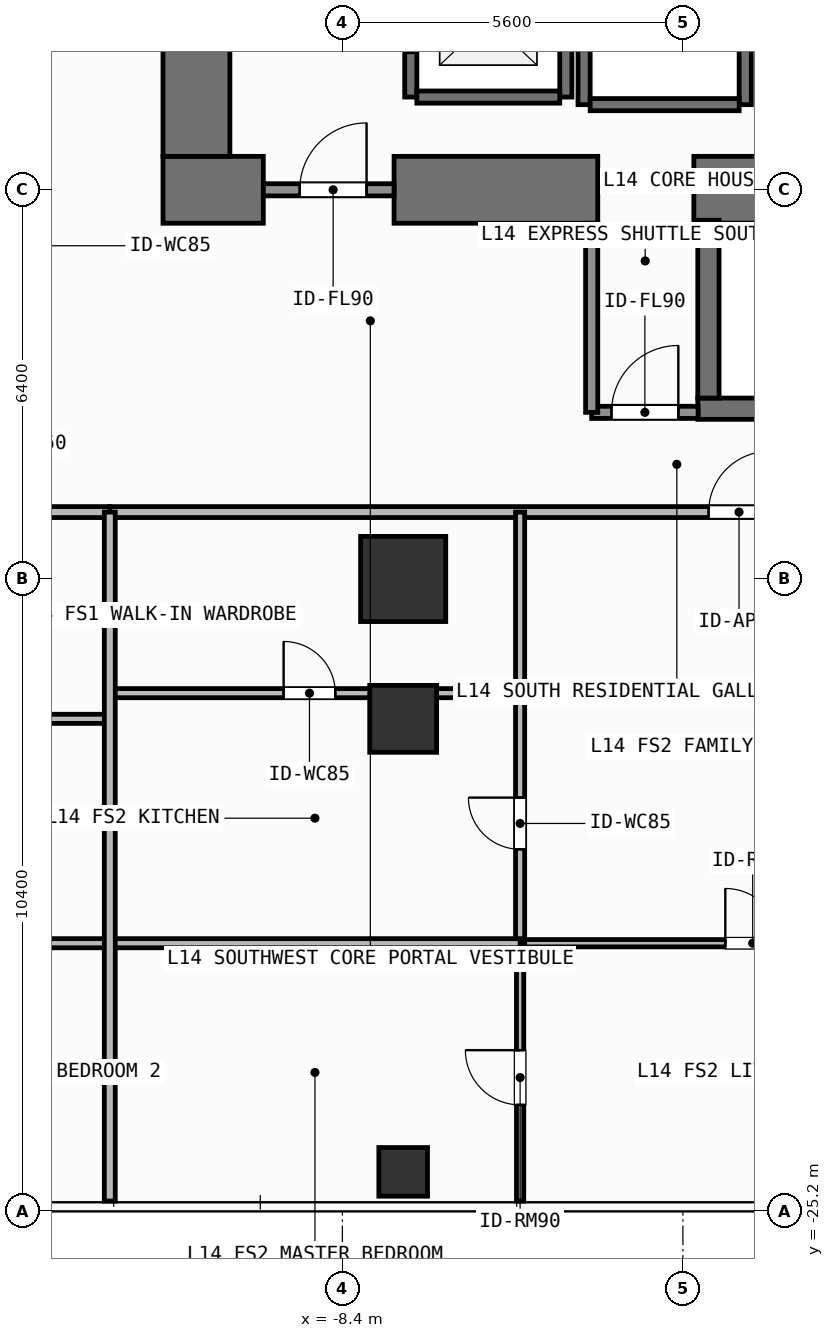
"""IFC4 building model, lengths in metres.
Left out: names, types, materials, properties, quantities, classifications, styles, units other than length and angle.
Written with IfcOpenShell. Run it as: python <this file> out.ifc"""

import sys

from ifc_helpers import new_model, si_unit, direction, frame, frame_2d, origin, origin_2d, place, context, subcontext, project, spatial, rectangle, hollow_rectangle, extrude, element, fill, save


model = new_model("IFC4")
c1 = context("Model", 3, precision=1e-05, world=origin(), true_north=direction((0.0, 1.0)))
c2 = subcontext(c1, "Body", "Model", "MODEL_VIEW")
j1 = project(units=[si_unit("LENGTHUNIT", "METRE"), si_unit("PLANEANGLEUNIT", "RADIAN")], contexts=[c1])
p1 = place(None, origin())
s1 = spatial("IfcSite", under=j1, at=p1, CompositionType="ELEMENT")
p2 = place(p1, origin())
s2 = spatial("IfcBuilding", under=s1, at=p2, CompositionType="ELEMENT")
p3 = place(p2, frame((0.0, 0.0, 54.0)))
s3 = spatial("IfcBuildingStorey", under=s2, at=p3, CompositionType="ELEMENT", Elevation=54.0)
p4 = place(p3, frame((-11.35, -8.4, 0.0), z_axis=(0.0, 0.0, 1.0), x_axis=(1.0, 0.0, 0.0)))
e1 = element("IfcWall", 1, at=p4, inside=s3, PredefinedType="SHEAR", context=c2, shape_type="SweptSolid", body=[
    extrude(rectangle(XDim=1.65, YDim=1.1, at=frame_2d((0.825, 0.0))), origin(), (0.0, 0.0, 1.0), 3.9),
])
p5 = place(p3, frame((-7.55, -8.4, 0.0), z_axis=(0.0, 0.0, 1.0), x_axis=(1.0, 0.0, 0.0)))
e2 = element("IfcWall", 2, at=p5, inside=s3, PredefinedType="SHEAR", context=c2, shape_type="SweptSolid", body=[
    extrude(rectangle(XDim=3.35, YDim=1.1, at=frame_2d((1.675, 0.0))), origin(), (0.0, 0.0, 1.0), 3.9),
])
p6 = place(p3, frame((-2.62, -8.4, 0.0), z_axis=(0.0, 0.0, 1.0), x_axis=(1.0, 0.0, 0.0)))
e3 = element("IfcWall", 3, at=p6, inside=s3, PredefinedType="SHEAR", context=c2, shape_type="SweptSolid", body=[
    extrude(rectangle(XDim=7.27, YDim=1.1, at=frame_2d((3.635, 0.0))), origin(), (0.0, 0.0, 1.0), 3.9),
])
p7 = place(p3, frame((-10.8, -7.85, 0.0), z_axis=(0.0, 0.0, 1.0), x_axis=(0.0, 1.0, 0.0)))
e4 = element("IfcWall", 4, at=p7, inside=s3, PredefinedType="SHEAR", context=c2, shape_type="SweptSolid", body=[
    extrude(rectangle(XDim=15.7, YDim=1.1, at=frame_2d((7.85, 0.0))), origin(), (0.0, 0.0, 1.0), 3.9),
])
p8 = place(p3, frame((-2.555, -12.0, 0.0), z_axis=(0.0, 0.0, 1.0), x_axis=(1.0, 0.0, 0.0)))
e5 = element("IfcWall", 5, at=p8, inside=s3, PredefinedType="SHEAR", context=c2, shape_type="SweptSolid", body=[
    extrude(rectangle(XDim=7.31, YDim=0.35, at=frame_2d((3.655, 0.0))), origin(), (0.0, 0.0, 1.0), 3.9),
])
p9 = place(p3, frame((-2.2, -8.988, 0.0), z_axis=(0.0, 0.0, 1.0), x_axis=(1.0, 0.0, 0.0)))
e6 = element("IfcWall", 6, at=p9, inside=s3, PredefinedType="SHEAR", context=c2, shape_type="SweptSolid", body=[
    extrude(rectangle(XDim=6.6, YDim=0.075, at=frame_2d((3.3, 0.0))), origin(), (0.0, 0.0, 1.0), 3.9),
])
p10 = place(p3, frame((-2.38, -11.825, 0.0), z_axis=(0.0, 0.0, 1.0), x_axis=(0.0, 1.0, 0.0)))
e7 = element("IfcWall", 7, at=p10, inside=s3, PredefinedType="SHEAR", context=c2, shape_type="SweptSolid", body=[
    extrude(rectangle(XDim=2.925, YDim=0.35, at=frame_2d((1.462, 0.0))), origin(), (0.0, 0.0, 1.0), 3.9),
])
p11 = place(p3, frame((-7.4, -14.8, 0.0), z_axis=(0.0, 0.0, 1.0), x_axis=(1.0, 0.0, 0.0)))
e8 = element("IfcColumn", 8, at=p11, inside=s3, PredefinedType="COLUMN", context=c2, shape_type="SweptSolid", body=[
    extrude(rectangle(XDim=1.4, YDim=1.4, at=origin_2d()), origin(), (0.0, 0.0, 1.0), 3.9),
])
p12 = place(p3, frame((-7.4, -17.1, 0.0), z_axis=(0.0, 0.0, 1.0), x_axis=(1.0, 0.0, 0.0)))
e9 = element("IfcColumn", 9, at=p12, inside=s3, PredefinedType="COLUMN", context=c2, shape_type="SweptSolid", body=[
    extrude(rectangle(XDim=1.1, YDim=1.1, at=origin_2d()), origin(), (0.0, 0.0, 1.0), 3.9),
])
p13 = place(p3, frame((-7.4, -24.55, 0.0), z_axis=(0.0, 0.0, 1.0), x_axis=(1.0, 0.0, 0.0)))
e10 = element("IfcColumn", 10, at=p13, inside=s3, PredefinedType="COLUMN", context=c2, shape_type="SweptSolid", body=[
    extrude(hollow_rectangle(XDim=0.8, YDim=0.8, WallThickness=0.036, at=origin_2d()), origin(), (0.0, 0.0, 1.0), 3.9),
])
p14 = place(p3, frame((-7.275, -6.875, 0.0), z_axis=(0.0, 0.0, 1.0), x_axis=(0.0, 1.0, 0.0)))
e11 = element("IfcWall", 11, at=p14, inside=s3, PredefinedType="SHEAR", context=c2, shape_type="SweptSolid", body=[
    extrude(rectangle(XDim=2.55, YDim=0.2, at=frame_2d((1.275, 0.0))), origin(), (0.0, 0.0, 1.0), 3.68),
])
p15 = place(p14, frame((0.725, 0.0, 0.0)))
e12 = element("IfcOpeningElement", 12, at=p15, cuts=e11, PredefinedType="OPENING", context=c2, shape_type="SweptSolid", body=[
    extrude(rectangle(XDim=1.1, YDim=2.2, at=frame_2d((0.55, 1.1))), frame((0.0, 0.11, 0.0), z_axis=(0.0, -1.0, 0.0), x_axis=(1.0, 0.0, 0.0)), (0.0, 0.0, 1.0), 0.22),
])
p16 = place(p3, frame((-4.725, -6.875, 0.0), z_axis=(0.0, 0.0, 1.0), x_axis=(0.0, 1.0, 0.0)))
e13 = element("IfcWall", 13, at=p16, inside=s3, PredefinedType="SHEAR", context=c2, shape_type="SweptSolid", body=[
    extrude(rectangle(XDim=2.55, YDim=0.2, at=frame_2d((1.275, 0.0))), origin(), (0.0, 0.0, 1.0), 3.68),
])
p17 = place(p3, frame((-7.175, -6.875, 0.0), z_axis=(0.0, 0.0, 1.0), x_axis=(1.0, 0.0, 0.0)))
e14 = element("IfcWall", 14, at=p17, inside=s3, PredefinedType="SHEAR", context=c2, shape_type="SweptSolid", body=[
    extrude(rectangle(XDim=2.35, YDim=0.2, at=frame_2d((1.175, 0.0))), origin(), (0.0, 0.0, 1.0), 3.68),
])
for number, where, z_axis, x_axis in (
    (15, (-4.425, -7.0, 0.0), (0.0, 0.0, 1.0), (0.0, 1.0, 0.0)),
    (16, (-1.775, -7.0, 0.0), (0.0, 0.0, 1.0), (0.0, 1.0, 0.0)),
):
    element("IfcWall", number, at=place(p3, frame(where, z_axis=z_axis, x_axis=x_axis)), inside=s3, PredefinedType="SHEAR", context=c2, shape_type="SweptSolid", body=[
        extrude(rectangle(XDim=2.8, YDim=0.2, at=frame_2d((1.4, 0.0))), origin(), (0.0, 0.0, 1.0), 3.68),
    ])
p18 = place(p3, frame((-4.325, -7.0, 0.0), z_axis=(0.0, 0.0, 1.0), x_axis=(1.0, 0.0, 0.0)))
e17 = element("IfcWall", 17, at=p18, inside=s3, PredefinedType="SHEAR", context=c2, shape_type="SweptSolid", body=[
    extrude(rectangle(XDim=2.45, YDim=0.2, at=frame_2d((1.225, 0.0))), origin(), (0.0, 0.0, 1.0), 3.68),
])
p19 = place(p3, frame((-9.7, -8.4, 0.0), z_axis=(0.0, 0.0, 1.0), x_axis=(1.0, 0.0, 0.0)))
e18 = element("IfcWall", 18, at=p19, inside=s3, PredefinedType="SOLIDWALL", context=c2, shape_type="SweptSolid", body=[
    extrude(rectangle(XDim=2.15, YDim=0.2, at=frame_2d((1.075, 0.0))), origin(), (0.0, 0.0, 1.0), 2.72),
])
p20 = place(p19, frame((0.598, 0.0, 0.0)))
e19 = element("IfcOpeningElement", 19, at=p20, cuts=e18, PredefinedType="OPENING", context=c2, shape_type="SweptSolid", body=[
    extrude(rectangle(XDim=1.1, YDim=2.15, at=frame_2d((0.55, 1.075))), frame((0.0, 0.11, 0.0), z_axis=(0.0, -1.0, 0.0), x_axis=(1.0, 0.0, 0.0)), (0.0, 0.0, 1.0), 0.22),
])
p21 = place(p3, frame((-4.3, -12.06, 0.0), z_axis=(0.0, 0.0, 1.0), x_axis=(1.0, 0.0, 0.0)))
e20 = element("IfcWall", 20, at=p21, inside=s3, PredefinedType="SOLIDWALL", context=c2, shape_type="SweptSolid", body=[
    extrude(rectangle(XDim=1.75, YDim=0.2, at=frame_2d((0.875, 0.0))), origin(), (0.0, 0.0, 1.0), 3.68),
])
p22 = place(p21, frame((0.325, 0.0, 0.0)))
e21 = element("IfcOpeningElement", 21, at=p22, cuts=e20, PredefinedType="OPENING", context=c2, shape_type="SweptSolid", body=[
    extrude(rectangle(XDim=1.1, YDim=2.15, at=frame_2d((0.55, 1.075))), frame((0.0, 0.11, 0.0), z_axis=(0.0, -1.0, 0.0), x_axis=(1.0, 0.0, 0.0)), (0.0, 0.0, 1.0), 0.22),
])
p23 = place(p3, frame((-24.42, -13.7, 0.0), z_axis=(0.0, 0.0, 1.0), x_axis=(1.0, 0.0, 0.0)))
e22 = element("IfcWall", 22, at=p23, inside=s3, PredefinedType="PARTITIONING", context=c2, shape_type="SweptSolid", body=[
    extrude(rectangle(XDim=12.195, YDim=0.18, at=frame_2d((6.097, 0.0))), origin(), (0.0, 0.0, 1.0), 3.68),
])
p24 = place(p23, frame((6.221, 0.0, 0.0)))
e23 = element("IfcOpeningElement", 23, at=p24, cuts=e22, PredefinedType="OPENING", context=c2, shape_type="SweptSolid", body=[
    extrude(rectangle(XDim=1.0, YDim=2.2, at=frame_2d((0.5, 1.1))), frame((0.0, 0.1, 0.0), z_axis=(0.0, -1.0, 0.0), x_axis=(1.0, 0.0, 0.0)), (0.0, 0.0, 1.0), 0.2),
])
p25 = place(p3, frame((-12.225, -13.7, 0.0), z_axis=(0.0, 0.0, 1.0), x_axis=(1.0, 0.0, 0.0)))
e24 = element("IfcWall", 24, at=p25, inside=s3, PredefinedType="PARTITIONING", context=c2, shape_type="SweptSolid", body=[
    extrude(rectangle(XDim=17.467, YDim=0.18, at=frame_2d((8.733, 0.0))), origin(), (0.0, 0.0, 1.0), 3.68),
])
p26 = place(p25, frame((9.848, 0.0, 0.0)))
e25 = element("IfcOpeningElement", 25, at=p26, cuts=e24, PredefinedType="OPENING", context=c2, shape_type="SweptSolid", body=[
    extrude(rectangle(XDim=1.0, YDim=2.2, at=frame_2d((0.5, 1.1))), frame((0.0, 0.1, 0.0), z_axis=(0.0, -1.0, 0.0), x_axis=(1.0, 0.0, 0.0)), (0.0, 0.0, 1.0), 0.2),
])
p27 = place(p3, frame((-5.477, -20.79, 0.0), z_axis=(0.0, 0.0, 1.0), x_axis=(1.0, 0.0, 0.0)))
e26 = element("IfcWall", 26, at=p27, inside=s3, PredefinedType="PARTITIONING", context=c2, shape_type="SweptSolid", body=[
    extrude(rectangle(XDim=7.471, YDim=0.12, at=frame_2d((3.735, 0.0))), origin(), (0.0, 0.0, 1.0), 3.68),
])
p28 = place(p27, frame((3.375, 0.0, 0.0)))
e27 = element("IfcOpeningElement", 27, at=p28, cuts=e26, PredefinedType="OPENING", context=c2, shape_type="SweptSolid", body=[
    extrude(rectangle(XDim=0.9, YDim=2.1, at=frame_2d((0.45, 1.05))), frame((0.0, 0.07, 0.0), z_axis=(0.0, -1.0, 0.0), x_axis=(1.0, 0.0, 0.0)), (0.0, 0.0, 1.0), 0.14),
])
p29 = place(p3, frame((-5.477, -20.79, 0.0), z_axis=(0.0, 0.0, 1.0), x_axis=(0.0, 1.0, 0.0)))
e28 = element("IfcWall", 28, at=p29, inside=s3, PredefinedType="PARTITIONING", context=c2, shape_type="SweptSolid", body=[
    extrude(rectangle(XDim=4.112, YDim=0.15, at=frame_2d((2.056, 0.0))), origin(), (0.0, 0.0, 1.0), 3.68),
])
p30 = place(p29, frame((1.544, 0.0, 0.0)))
e29 = element("IfcOpeningElement", 29, at=p30, cuts=e28, PredefinedType="OPENING", context=c2, shape_type="SweptSolid", body=[
    extrude(rectangle(XDim=0.85, YDim=2.1, at=frame_2d((0.425, 1.05))), frame((0.0, 0.085, 0.0), z_axis=(0.0, -1.0, 0.0), x_axis=(1.0, 0.0, 0.0)), (0.0, 0.0, 1.0), 0.17),
])
p31 = place(p3, frame((-5.477, -16.678, 0.0), z_axis=(0.0, 0.0, 1.0), x_axis=(0.0, 1.0, 0.0)))
e30 = element("IfcWall", 30, at=p31, inside=s3, PredefinedType="PARTITIONING", context=c2, shape_type="SweptSolid", body=[
    extrude(rectangle(XDim=2.978, YDim=0.15, at=frame_2d((1.489, 0.0))), origin(), (0.0, 0.0, 1.0), 3.68),
])
p32 = place(p3, frame((-5.477, -25.03, 0.0), z_axis=(0.0, 0.0, 1.0), x_axis=(0.0, 1.0, 0.0)))
e31 = element("IfcWall", 31, at=p32, inside=s3, PredefinedType="PARTITIONING", context=c2, shape_type="SweptSolid", body=[
    extrude(rectangle(XDim=4.24, YDim=0.12, at=frame_2d((2.12, 0.0))), origin(), (0.0, 0.0, 1.0), 3.68),
])
p33 = place(p32, frame((1.581, 0.0, 0.0)))
e32 = element("IfcOpeningElement", 32, at=p33, cuts=e31, PredefinedType="OPENING", context=c2, shape_type="SweptSolid", body=[
    extrude(rectangle(XDim=0.9, YDim=2.1, at=frame_2d((0.45, 1.05))), frame((0.0, 0.07, 0.0), z_axis=(0.0, -1.0, 0.0), x_axis=(1.0, 0.0, 0.0)), (0.0, 0.0, 1.0), 0.14),
])
p34 = place(p3, frame((-4.3, -12.06, 0.0), z_axis=(0.0, 0.0, 1.0), x_axis=(0.0, 1.0, 0.0)))
e33 = element("IfcWall", 33, at=p34, inside=s3, PredefinedType="SOLIDWALL", context=c2, shape_type="SweptSolid", body=[
    extrude(rectangle(XDim=3.11, YDim=0.2, at=frame_2d((1.555, 0.0))), origin(), (0.0, 0.0, 1.0), 3.68),
])
p35 = place(p3, frame((-16.791, -17.1, 0.0), z_axis=(0.0, 0.0, 1.0), x_axis=(1.0, 0.0, 0.0)))
e34 = element("IfcWall", 34, at=p35, inside=s3, PredefinedType="PARTITIONING", context=c2, shape_type="SweptSolid", body=[
    extrude(rectangle(XDim=4.566, YDim=0.15, at=frame_2d((2.283, 0.0))), origin(), (0.0, 0.0, 1.0), 3.082),
])
p36 = place(p3, frame((-16.791, -20.79, 0.0), z_axis=(0.0, 0.0, 1.0), x_axis=(1.0, 0.0, 0.0)))
e35 = element("IfcWall", 35, at=p36, inside=s3, PredefinedType="PARTITIONING", context=c2, shape_type="SweptSolid", body=[
    extrude(rectangle(XDim=4.566, YDim=0.15, at=frame_2d((2.283, 0.0))), origin(), (0.0, 0.0, 1.0), 3.68),
])
p37 = place(p3, frame((-12.225, -16.678, 0.0), z_axis=(0.0, 0.0, 1.0), x_axis=(1.0, 0.0, 0.0)))
e36 = element("IfcWall", 36, at=p37, inside=s3, PredefinedType="PARTITIONING", context=c2, shape_type="SweptSolid", body=[
    extrude(rectangle(XDim=6.748, YDim=0.15, at=frame_2d((3.374, 0.0))), origin(), (0.0, 0.0, 1.0), 3.68),
])
p38 = place(p37, frame((2.859, 0.0, 0.0)))
e37 = element("IfcOpeningElement", 37, at=p38, cuts=e36, PredefinedType="OPENING", context=c2, shape_type="SweptSolid", body=[
    extrude(rectangle(XDim=0.85, YDim=2.1, at=frame_2d((0.425, 1.05))), frame((0.0, 0.085, 0.0), z_axis=(0.0, -1.0, 0.0), x_axis=(1.0, 0.0, 0.0)), (0.0, 0.0, 1.0), 0.17),
])
p39 = place(p3, frame((-12.225, -20.79, 0.0), z_axis=(0.0, 0.0, 1.0), x_axis=(1.0, 0.0, 0.0)))
e38 = element("IfcWall", 38, at=p39, inside=s3, PredefinedType="PARTITIONING", context=c2, shape_type="SweptSolid", body=[
    extrude(rectangle(XDim=6.748, YDim=0.15, at=frame_2d((3.374, 0.0))), origin(), (0.0, 0.0, 1.0), 3.68),
])
p40 = place(p3, frame((-12.225, -25.03, 0.0), z_axis=(0.0, 0.0, 1.0), x_axis=(0.0, 1.0, 0.0)))
e39 = element("IfcWall", 39, at=p40, inside=s3, PredefinedType="PARTITIONING", context=c2, shape_type="SweptSolid", body=[
    extrude(rectangle(XDim=11.33, YDim=0.18, at=frame_2d((5.665, 0.0))), origin(), (0.0, 0.0, 1.0), 3.68),
])
p41 = place(p15, origin())
e40 = element("IfcDoor", 40, at=p41, inside=s3, OperationType="SLIDING_TO_LEFT", PredefinedType="DOOR", context=c2, shape_type="SweptSolid", body=[
    extrude(rectangle(XDim=1.1, YDim=2.2, at=frame_2d((0.55, 1.1))), frame((0.0, 0.025, 0.0), z_axis=(0.0, -1.0, 0.0), x_axis=(1.0, 0.0, 0.0)), (0.0, 0.0, 1.0), 0.05),
])
fill(e12, e40)
p42 = place(p20, origin())
e41 = element("IfcDoor", 41, at=p42, inside=s3, OperationType="SINGLE_SWING_RIGHT", PredefinedType="DOOR", context=c2, shape_type="SweptSolid", body=[
    extrude(rectangle(XDim=1.1, YDim=2.15, at=frame_2d((0.55, 1.075))), frame((0.0, 0.025, 0.0), z_axis=(0.0, -1.0, 0.0), x_axis=(1.0, 0.0, 0.0)), (0.0, 0.0, 1.0), 0.05),
])
fill(e19, e41)
p43 = place(p22, origin())
e42 = element("IfcDoor", 42, at=p43, inside=s3, OperationType="SINGLE_SWING_RIGHT", PredefinedType="DOOR", context=c2, shape_type="SweptSolid", body=[
    extrude(rectangle(XDim=1.1, YDim=2.15, at=frame_2d((0.55, 1.075))), frame((0.0, 0.025, 0.0), z_axis=(0.0, -1.0, 0.0), x_axis=(1.0, 0.0, 0.0)), (0.0, 0.0, 1.0), 0.05),
])
fill(e21, e42)
p44 = place(p26, origin())
e43 = element("IfcDoor", 43, at=p44, inside=s3, OperationType="SINGLE_SWING_RIGHT", PredefinedType="DOOR", context=c2, shape_type="SweptSolid", body=[
    extrude(rectangle(XDim=1.0, YDim=2.2, at=frame_2d((0.5, 1.1))), frame((0.0, 0.025, 0.0), z_axis=(0.0, -1.0, 0.0), x_axis=(1.0, 0.0, 0.0)), (0.0, 0.0, 1.0), 0.05),
])
fill(e25, e43)
p45 = place(p28, origin())
e44 = element("IfcDoor", 44, at=p45, inside=s3, OperationType="SINGLE_SWING_LEFT", PredefinedType="DOOR", context=c2, shape_type="SweptSolid", body=[
    extrude(rectangle(XDim=0.9, YDim=2.1, at=frame_2d((0.45, 1.05))), frame((0.0, 0.025, 0.0), z_axis=(0.0, -1.0, 0.0), x_axis=(1.0, 0.0, 0.0)), (0.0, 0.0, 1.0), 0.05),
])
fill(e27, e44)
p46 = place(p30, origin())
e45 = element("IfcDoor", 45, at=p46, inside=s3, OperationType="SINGLE_SWING_RIGHT", PredefinedType="DOOR", context=c2, shape_type="SweptSolid", body=[
    extrude(rectangle(XDim=0.85, YDim=2.1, at=frame_2d((0.425, 1.05))), frame((0.0, 0.025, 0.0), z_axis=(0.0, -1.0, 0.0), x_axis=(1.0, 0.0, 0.0)), (0.0, 0.0, 1.0), 0.05),
])
fill(e29, e45)
p47 = place(p38, origin())
e46 = element("IfcDoor", 46, at=p47, inside=s3, OperationType="SINGLE_SWING_LEFT", PredefinedType="DOOR", context=c2, shape_type="SweptSolid", body=[
    extrude(rectangle(XDim=0.85, YDim=2.1, at=frame_2d((0.425, 1.05))), frame((0.0, 0.025, 0.0), z_axis=(0.0, -1.0, 0.0), x_axis=(1.0, 0.0, 0.0)), (0.0, 0.0, 1.0), 0.05),
])
fill(e37, e46)
p48 = place(p33, origin())
e47 = element("IfcDoor", 47, at=p48, inside=s3, OperationType="SINGLE_SWING_RIGHT", PredefinedType="DOOR", context=c2, shape_type="SweptSolid", body=[
    extrude(rectangle(XDim=0.9, YDim=2.1, at=frame_2d((0.45, 1.05))), frame((0.0, 0.025, 0.0), z_axis=(0.0, -1.0, 0.0), x_axis=(1.0, 0.0, 0.0)), (0.0, 0.0, 1.0), 0.05),
])
fill(e32, e47)
save(model, sys.argv[1])
